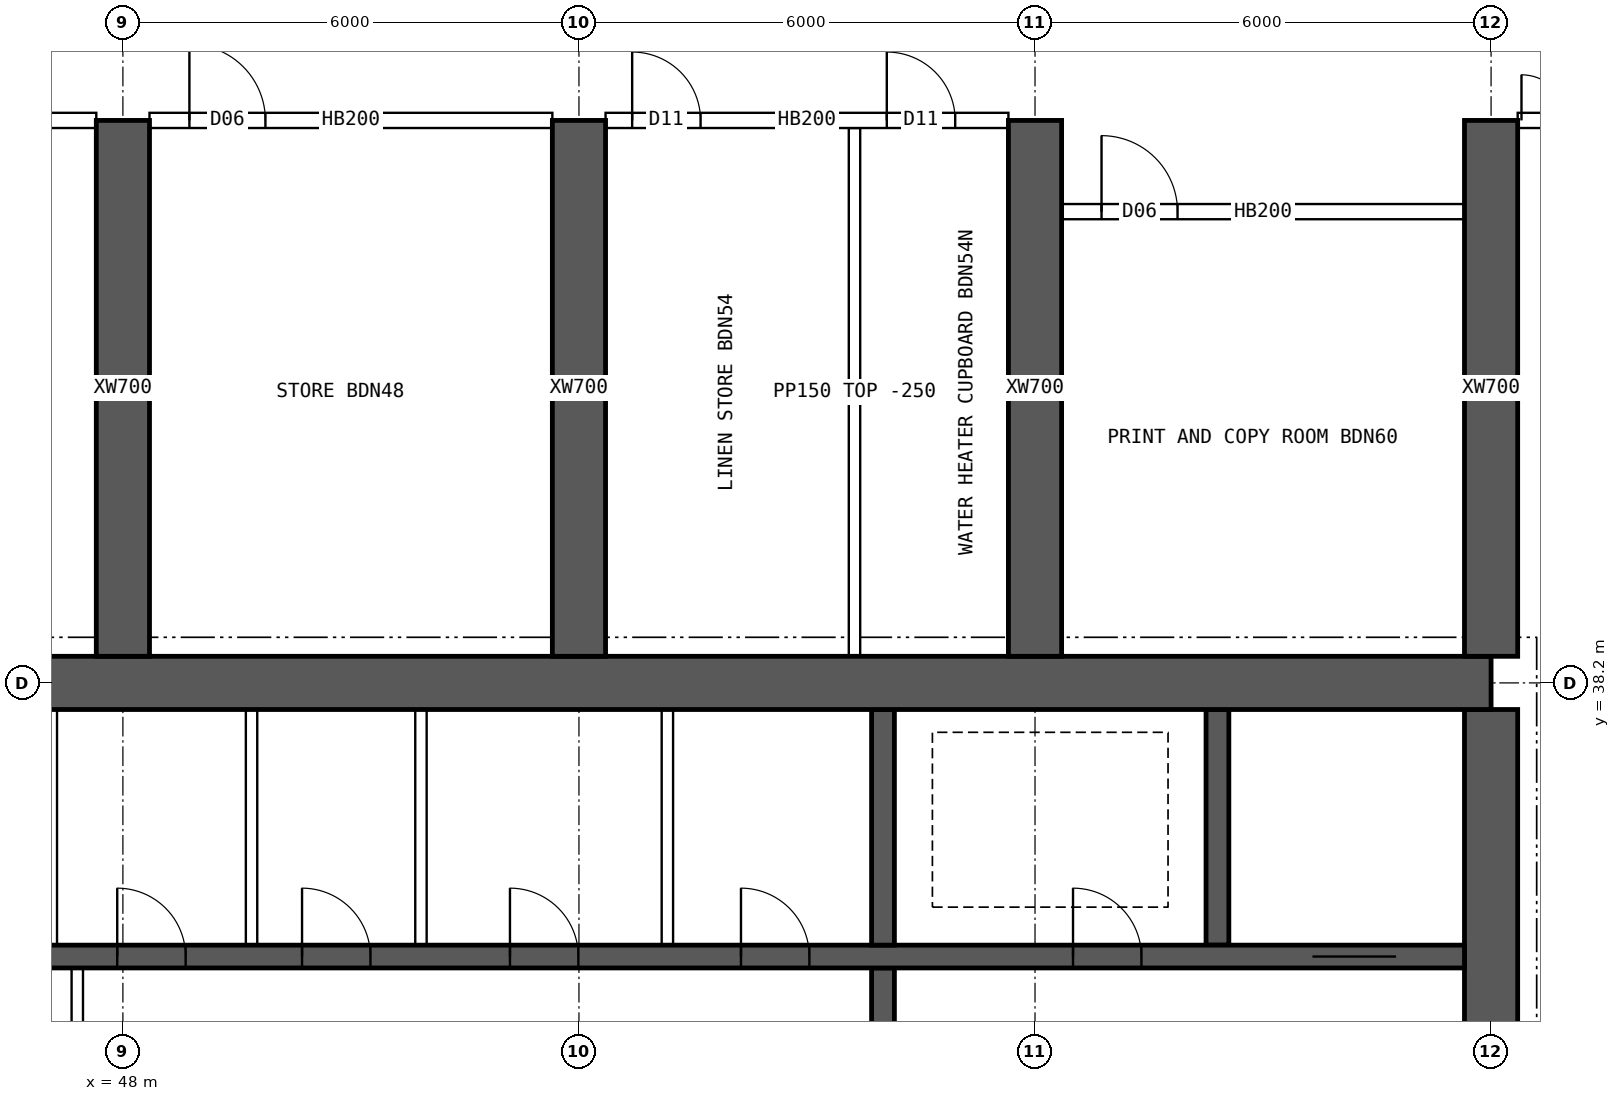
"""IFC4 building model, lengths in metres.
Left out: names, types, materials, properties, quantities, classifications, styles, units other than length and angle.
Written with IfcOpenShell. Run it as: python <this file> out.ifc"""

import sys

from ifc_helpers import new_model, si_unit, direction, frame, frame_2d, origin, place, context, subcontext, project, spatial, rectangle, extrude, element, fill, save


model = new_model("IFC4")
c1 = context("Model", 3, precision=1e-05, world=origin(), true_north=direction((0.0, 1.0)))
c2 = subcontext(c1, "Body", "Model", "MODEL_VIEW")
j1 = project(units=[si_unit("LENGTHUNIT", "METRE"), si_unit("PLANEANGLEUNIT", "RADIAN")], contexts=[c1])
p1 = place(None, origin())
s1 = spatial("IfcSite", under=j1, at=p1, CompositionType="ELEMENT")
p2 = place(p1, origin())
s2 = spatial("IfcBuilding", under=s1, at=p2, CompositionType="ELEMENT")
p3 = place(p2, frame((0.0, 0.0, 224.05)))
s3 = spatial("IfcBuildingStorey", under=s2, at=p3, CompositionType="ELEMENT", Elevation=224.05)
p4 = place(p3, frame((18.0, 38.2, 0.0), z_axis=(0.0, 0.0, 1.0), x_axis=(1.0, 0.0, 0.0)))
e1 = element("IfcWall", 1, at=p4, inside=s3, PredefinedType="SHEAR", context=c2, shape_type="SweptSolid", body=[
    extrude(rectangle(XDim=48.0, YDim=0.7, at=frame_2d((24.0, 0.0))), origin(), (0.0, 0.0, 1.0), 3.75),
])
p5 = place(p3, frame((66.0, 26.15, 0.0), z_axis=(0.0, 0.0, 1.0), x_axis=(0.0, 1.0, 0.0)))
e2 = element("IfcWall", 2, at=p5, inside=s3, PredefinedType="SHEAR", context=c2, shape_type="SweptSolid", body=[
    extrude(rectangle(XDim=11.7, YDim=0.7, at=frame_2d((5.85, 0.0))), origin(), (0.0, 0.0, 1.0), 3.75),
])
p6 = place(p5, frame((5.15, 0.0, 0.0)))
e3 = element("IfcOpeningElement", 3, at=p6, cuts=e2, PredefinedType="OPENING", context=c2, shape_type="SweptSolid", body=[
    extrude(rectangle(XDim=1.2, YDim=2.1, at=frame_2d((0.6, 1.05))), frame((0.0, 0.36, 0.0), z_axis=(0.0, -1.0, 0.0), x_axis=(1.0, 0.0, 0.0)), (0.0, 0.0, 1.0), 0.72),
])
p7 = place(p3, frame((18.35, 34.6, 0.0), z_axis=(0.0, 0.0, 1.0), x_axis=(1.0, 0.0, 0.0)))
e4 = element("IfcWall", 4, at=p7, inside=s3, PredefinedType="SHEAR", context=c2, shape_type="SweptSolid", body=[
    extrude(rectangle(XDim=47.3, YDim=0.3, at=frame_2d((23.65, 0.0))), origin(), (0.0, 0.0, 1.0), 3.75),
])
p8 = place(p7, frame((0.9, 0.0, 0.0)))
e5 = element("IfcOpeningElement", 5, at=p8, cuts=e4, PredefinedType="OPENING", context=c2, shape_type="SweptSolid", body=[
    extrude(rectangle(XDim=1.1, YDim=2.1, at=frame_2d((0.55, 1.05))), frame((0.0, 0.16, 0.0), z_axis=(0.0, -1.0, 0.0), x_axis=(1.0, 0.0, 0.0)), (0.0, 0.0, 1.0), 0.32),
])
p9 = place(p7, frame((45.3, 0.0, 0.0)))
e6 = element("IfcOpeningElement", 6, at=p9, cuts=e4, PredefinedType="OPENING", context=c2, shape_type="SweptSolid", body=[
    extrude(rectangle(XDim=1.1, YDim=2.1, at=frame_2d((0.55, 1.05))), frame((0.0, 0.16, 0.0), z_axis=(0.0, -1.0, 0.0), x_axis=(1.0, 0.0, 0.0)), (0.0, 0.0, 1.0), 0.32),
])
p10 = place(p7, frame((4.25, 0.0, 0.0)))
e7 = element("IfcOpeningElement", 7, at=p10, cuts=e4, PredefinedType="OPENING", context=c2, shape_type="SweptSolid", body=[
    extrude(rectangle(XDim=0.9, YDim=2.1, at=frame_2d((0.45, 1.05))), frame((0.0, 0.16, 0.0), z_axis=(0.0, -1.0, 0.0), x_axis=(1.0, 0.0, 0.0)), (0.0, 0.0, 1.0), 0.32),
])
p11 = place(p7, frame((42.15, 0.0, 0.0)))
e8 = element("IfcOpeningElement", 8, at=p11, cuts=e4, PredefinedType="OPENING", context=c2, shape_type="SweptSolid", body=[
    extrude(rectangle(XDim=0.9, YDim=2.1, at=frame_2d((0.45, 1.05))), frame((0.0, 0.16, 0.0), z_axis=(0.0, -1.0, 0.0), x_axis=(1.0, 0.0, 0.0)), (0.0, 0.0, 1.0), 0.32),
])
p12 = place(p7, frame((9.025, 0.0, 0.0)))
e9 = element("IfcOpeningElement", 9, at=p12, cuts=e4, PredefinedType="OPENING", context=c2, shape_type="SweptSolid", body=[
    extrude(rectangle(XDim=0.9, YDim=2.1, at=frame_2d((0.45, 1.05))), frame((0.0, 0.16, 0.0), z_axis=(0.0, -1.0, 0.0), x_axis=(1.0, 0.0, 0.0)), (0.0, 0.0, 1.0), 0.32),
])
p13 = place(p7, frame((12.999, 0.0, 0.0)))
e10 = element("IfcOpeningElement", 10, at=p13, cuts=e4, PredefinedType="OPENING", context=c2, shape_type="SweptSolid", body=[
    extrude(rectangle(XDim=0.9, YDim=2.1, at=frame_2d((0.45, 1.05))), frame((0.0, 0.16, 0.0), z_axis=(0.0, -1.0, 0.0), x_axis=(1.0, 0.0, 0.0)), (0.0, 0.0, 1.0), 0.32),
])
p14 = place(p7, frame((16.646, 0.0, 0.0)))
e11 = element("IfcOpeningElement", 11, at=p14, cuts=e4, PredefinedType="OPENING", context=c2, shape_type="SweptSolid", body=[
    extrude(rectangle(XDim=0.9, YDim=2.1, at=frame_2d((0.45, 1.05))), frame((0.0, 0.16, 0.0), z_axis=(0.0, -1.0, 0.0), x_axis=(1.0, 0.0, 0.0)), (0.0, 0.0, 1.0), 0.32),
])
p15 = place(p7, frame((20.405, 0.0, 0.0)))
e12 = element("IfcOpeningElement", 12, at=p15, cuts=e4, PredefinedType="OPENING", context=c2, shape_type="SweptSolid", body=[
    extrude(rectangle(XDim=0.9, YDim=2.1, at=frame_2d((0.45, 1.05))), frame((0.0, 0.16, 0.0), z_axis=(0.0, -1.0, 0.0), x_axis=(1.0, 0.0, 0.0)), (0.0, 0.0, 1.0), 0.32),
])
p16 = place(p7, frame((24.811, 0.0, 0.0)))
e13 = element("IfcOpeningElement", 13, at=p16, cuts=e4, PredefinedType="OPENING", context=c2, shape_type="SweptSolid", body=[
    extrude(rectangle(XDim=0.9, YDim=2.1, at=frame_2d((0.45, 1.05))), frame((0.0, 0.16, 0.0), z_axis=(0.0, -1.0, 0.0), x_axis=(1.0, 0.0, 0.0)), (0.0, 0.0, 1.0), 0.32),
])
p17 = place(p7, frame((27.608, 0.0, 0.0)))
e14 = element("IfcOpeningElement", 14, at=p17, cuts=e4, PredefinedType="OPENING", context=c2, shape_type="SweptSolid", body=[
    extrude(rectangle(XDim=0.9, YDim=2.1, at=frame_2d((0.45, 1.05))), frame((0.0, 0.16, 0.0), z_axis=(0.0, -1.0, 0.0), x_axis=(1.0, 0.0, 0.0)), (0.0, 0.0, 1.0), 0.32),
])
p18 = place(p7, frame((29.575, 0.0, 0.0)))
e15 = element("IfcOpeningElement", 15, at=p18, cuts=e4, PredefinedType="OPENING", context=c2, shape_type="SweptSolid", body=[
    extrude(rectangle(XDim=0.9, YDim=2.1, at=frame_2d((0.45, 1.05))), frame((0.0, 0.16, 0.0), z_axis=(0.0, -1.0, 0.0), x_axis=(1.0, 0.0, 0.0)), (0.0, 0.0, 1.0), 0.32),
])
p19 = place(p7, frame((32.007, 0.0, 0.0)))
e16 = element("IfcOpeningElement", 16, at=p19, cuts=e4, PredefinedType="OPENING", context=c2, shape_type="SweptSolid", body=[
    extrude(rectangle(XDim=0.9, YDim=2.1, at=frame_2d((0.45, 1.05))), frame((0.0, 0.16, 0.0), z_axis=(0.0, -1.0, 0.0), x_axis=(1.0, 0.0, 0.0)), (0.0, 0.0, 1.0), 0.32),
])
p20 = place(p7, frame((34.742, 0.0, 0.0)))
e17 = element("IfcOpeningElement", 17, at=p20, cuts=e4, PredefinedType="OPENING", context=c2, shape_type="SweptSolid", body=[
    extrude(rectangle(XDim=0.9, YDim=2.1, at=frame_2d((0.45, 1.05))), frame((0.0, 0.16, 0.0), z_axis=(0.0, -1.0, 0.0), x_axis=(1.0, 0.0, 0.0)), (0.0, 0.0, 1.0), 0.32),
])
p21 = place(p7, frame((37.781, 0.0, 0.0)))
e18 = element("IfcOpeningElement", 18, at=p21, cuts=e4, PredefinedType="OPENING", context=c2, shape_type="SweptSolid", body=[
    extrude(rectangle(XDim=0.9, YDim=2.1, at=frame_2d((0.45, 1.05))), frame((0.0, 0.16, 0.0), z_axis=(0.0, -1.0, 0.0), x_axis=(1.0, 0.0, 0.0)), (0.0, 0.0, 1.0), 0.32),
])
p22 = place(p3, frame((58.0, 30.55, 0.0), z_axis=(0.0, 0.0, 1.0), x_axis=(0.0, 1.0, 0.0)))
e19 = element("IfcWall", 19, at=p22, inside=s3, PredefinedType="SHEAR", context=c2, shape_type="SweptSolid", body=[
    extrude(rectangle(XDim=3.9, YDim=0.3, at=frame_2d((1.95, 0.0))), origin(), (0.0, 0.0, 1.0), 3.75),
])
p23 = place(p22, frame((1.4, 0.0, 0.0)))
e20 = element("IfcOpeningElement", 20, at=p23, cuts=e19, PredefinedType="OPENING", context=c2, shape_type="SweptSolid", body=[
    extrude(rectangle(XDim=1.2, YDim=2.1, at=frame_2d((0.6, 1.05))), frame((0.0, 0.16, 0.0), z_axis=(0.0, -1.0, 0.0), x_axis=(1.0, 0.0, 0.0)), (0.0, 0.0, 1.0), 0.32),
])
for number, where, z_axis, x_axis in (
    (21, (62.4, 34.75, 0.0), (0.0, 0.0, 1.0), (0.0, 1.0, 0.0)),
    (22, (58.0, 34.75, 0.0), (0.0, 0.0, 1.0), (0.0, 1.0, 0.0)),
):
    element("IfcWall", number, at=place(p3, frame(where, z_axis=z_axis, x_axis=x_axis)), inside=s3, PredefinedType="SHEAR", context=c2, shape_type="SweptSolid", body=[
        extrude(rectangle(XDim=3.1, YDim=0.3, at=frame_2d((1.55, 0.0))), origin(), (0.0, 0.0, 1.0), 3.75),
    ])
for number, where, z_axis, x_axis in (
    (23, (48.0, 38.55, 0.0), (0.0, 0.0, 1.0), (0.0, 1.0, 0.0)),
    (24, (54.0, 38.55, 0.0), (0.0, 0.0, 1.0), (0.0, 1.0, 0.0)),
    (25, (60.0, 38.55, 0.0), (0.0, 0.0, 1.0), (0.0, 1.0, 0.0)),
    (26, (66.0, 38.55, 0.0), (0.0, 0.0, 1.0), (0.0, 1.0, 0.0)),
):
    element("IfcWall", number, at=place(p3, frame(where, z_axis=z_axis, x_axis=x_axis)), inside=s3, PredefinedType="SHEAR", context=c2, shape_type="SweptSolid", body=[
        extrude(rectangle(XDim=7.05, YDim=0.7, at=frame_2d((3.525, 0.0))), origin(), (0.0, 0.0, 1.0), 3.75),
    ])
p24 = place(p3, frame((47.4, 30.55, 0.0), z_axis=(0.0, 0.0, 1.0), x_axis=(0.0, 1.0, 0.0)))
e27 = element("IfcWall", 27, at=p24, inside=s3, PredefinedType="SOLIDWALL", context=c2, shape_type="SweptSolid", body=[
    extrude(rectangle(XDim=3.9, YDim=0.15, at=frame_2d((1.95, 0.0))), origin(), (0.0, 0.0, 1.0), 3.5),
])
p25 = place(p24, frame((1.15, 0.0, 0.0)))
e28 = element("IfcOpeningElement", 28, at=p25, cuts=e27, PredefinedType="OPENING", context=c2, shape_type="SweptSolid", body=[
    extrude(rectangle(XDim=1.6, YDim=2.1, at=frame_2d((0.8, 1.05))), frame((0.0, 0.085, 0.0), z_axis=(0.0, -1.0, 0.0), x_axis=(1.0, 0.0, 0.0)), (0.0, 0.0, 1.0), 0.17),
])
for number, where, z_axis, x_axis in (
    (29, (47.058, 34.75, 0.0), (0.0, 0.0, 1.0), (0.0, 1.0, 0.0)),
    (30, (49.692, 34.75, 0.0), (0.0, 0.0, 1.0), (0.0, 1.0, 0.0)),
    (31, (51.921, 34.75, 0.0), (0.0, 0.0, 1.0), (0.0, 1.0, 0.0)),
    (32, (55.163, 34.75, 0.0), (0.0, 0.0, 1.0), (0.0, 1.0, 0.0)),
):
    element("IfcWall", number, at=place(p3, frame(where, z_axis=z_axis, x_axis=x_axis)), inside=s3, PredefinedType="SOLIDWALL", context=c2, shape_type="SweptSolid", body=[
        extrude(rectangle(XDim=3.1, YDim=0.15, at=frame_2d((1.55, 0.0))), origin(), (0.0, 0.0, 1.0), 3.5),
    ])
p26 = place(p3, frame((42.35, 45.6, 0.0), z_axis=(0.0, 0.0, 1.0), x_axis=(1.0, 0.0, 0.0)))
e33 = element("IfcWall", 33, at=p26, inside=s3, PredefinedType="SOLIDWALL", context=c2, shape_type="SweptSolid", body=[
    extrude(rectangle(XDim=5.3, YDim=0.2, at=frame_2d((2.65, 0.0))), origin(), (0.0, 0.0, 1.0), 3.5),
])
p27 = place(p26, frame((0.35, 0.0, 0.0)))
e34 = element("IfcOpeningElement", 34, at=p27, cuts=e33, PredefinedType="OPENING", context=c2, shape_type="SweptSolid", body=[
    extrude(rectangle(XDim=0.9, YDim=2.1, at=frame_2d((0.45, 1.05))), frame((0.0, 0.11, 0.0), z_axis=(0.0, -1.0, 0.0), x_axis=(1.0, 0.0, 0.0)), (0.0, 0.0, 1.0), 0.22),
])
p28 = place(p26, frame((2.735, 0.0, 0.0)))
e35 = element("IfcOpeningElement", 35, at=p28, cuts=e33, PredefinedType="OPENING", context=c2, shape_type="SweptSolid", body=[
    extrude(rectangle(XDim=0.9, YDim=2.1, at=frame_2d((0.45, 1.05))), frame((0.0, 0.11, 0.0), z_axis=(0.0, -1.0, 0.0), x_axis=(1.0, 0.0, 0.0)), (0.0, 0.0, 1.0), 0.22),
])
p29 = place(p3, frame((48.35, 45.6, 0.0), z_axis=(0.0, 0.0, 1.0), x_axis=(1.0, 0.0, 0.0)))
e36 = element("IfcWall", 36, at=p29, inside=s3, PredefinedType="SOLIDWALL", context=c2, shape_type="SweptSolid", body=[
    extrude(rectangle(XDim=5.3, YDim=0.2, at=frame_2d((2.65, 0.0))), origin(), (0.0, 0.0, 1.0), 3.5),
])
p30 = place(p29, frame((0.525, 0.0, 0.0)))
e37 = element("IfcOpeningElement", 37, at=p30, cuts=e36, PredefinedType="OPENING", context=c2, shape_type="SweptSolid", body=[
    extrude(rectangle(XDim=1.0, YDim=2.1, at=frame_2d((0.5, 1.05))), frame((0.0, 0.11, 0.0), z_axis=(0.0, -1.0, 0.0), x_axis=(1.0, 0.0, 0.0)), (0.0, 0.0, 1.0), 0.22),
])
p31 = place(p3, frame((54.35, 45.6, 0.0), z_axis=(0.0, 0.0, 1.0), x_axis=(1.0, 0.0, 0.0)))
e38 = element("IfcWall", 38, at=p31, inside=s3, PredefinedType="SOLIDWALL", context=c2, shape_type="SweptSolid", body=[
    extrude(rectangle(XDim=5.3, YDim=0.2, at=frame_2d((2.65, 0.0))), origin(), (0.0, 0.0, 1.0), 3.5),
])
p32 = place(p31, frame((0.35, 0.0, 0.0)))
e39 = element("IfcOpeningElement", 39, at=p32, cuts=e38, PredefinedType="OPENING", context=c2, shape_type="SweptSolid", body=[
    extrude(rectangle(XDim=0.9, YDim=2.1, at=frame_2d((0.45, 1.05))), frame((0.0, 0.11, 0.0), z_axis=(0.0, -1.0, 0.0), x_axis=(1.0, 0.0, 0.0)), (0.0, 0.0, 1.0), 0.22),
])
p33 = place(p31, frame((3.7, 0.0, 0.0)))
e40 = element("IfcOpeningElement", 40, at=p33, cuts=e38, PredefinedType="OPENING", context=c2, shape_type="SweptSolid", body=[
    extrude(rectangle(XDim=0.9, YDim=2.1, at=frame_2d((0.45, 1.05))), frame((0.0, 0.11, 0.0), z_axis=(0.0, -1.0, 0.0), x_axis=(1.0, 0.0, 0.0)), (0.0, 0.0, 1.0), 0.22),
])
p34 = place(p3, frame((66.35, 45.6, 0.0), z_axis=(0.0, 0.0, 1.0), x_axis=(1.0, 0.0, 0.0)))
e41 = element("IfcWall", 41, at=p34, inside=s3, PredefinedType="SOLIDWALL", context=c2, shape_type="SweptSolid", body=[
    extrude(rectangle(XDim=2.05, YDim=0.2, at=frame_2d((1.025, 0.0))), origin(), (0.0, 0.0, 1.0), 3.5),
])
p35 = place(p34, frame((0.05, 0.0, 0.0)))
e42 = element("IfcOpeningElement", 42, at=p35, cuts=e41, PredefinedType="OPENING", context=c2, shape_type="SweptSolid", body=[
    extrude(rectangle(XDim=1.2, YDim=2.1, at=frame_2d((0.6, 1.05))), frame((0.0, 0.11, 0.0), z_axis=(0.0, -1.0, 0.0), x_axis=(1.0, 0.0, 0.0)), (0.0, 0.0, 1.0), 0.22),
])
p36 = place(p3, frame((57.625, 38.55, 0.0), z_axis=(0.0, 0.0, 1.0), x_axis=(0.0, 1.0, 0.0)))
e43 = element("IfcWall", 43, at=p36, inside=s3, PredefinedType="PARTITIONING", context=c2, shape_type="SweptSolid", body=[
    extrude(rectangle(XDim=6.95, YDim=0.15, at=frame_2d((3.475, 0.0))), origin(), (0.0, 0.0, 1.0), 3.5),
])
p37 = place(p3, frame((60.35, 44.4, 0.0), z_axis=(0.0, 0.0, 1.0), x_axis=(1.0, 0.0, 0.0)))
e44 = element("IfcWall", 44, at=p37, inside=s3, PredefinedType="SOLIDWALL", context=c2, shape_type="SweptSolid", body=[
    extrude(rectangle(XDim=5.3, YDim=0.2, at=frame_2d((2.65, 0.0))), origin(), (0.0, 0.0, 1.0), 3.5),
])
p38 = place(p37, frame((0.525, 0.0, 0.0)))
e45 = element("IfcOpeningElement", 45, at=p38, cuts=e44, PredefinedType="OPENING", context=c2, shape_type="SweptSolid", body=[
    extrude(rectangle(XDim=1.0, YDim=2.1, at=frame_2d((0.5, 1.05))), frame((0.0, 0.11, 0.0), z_axis=(0.0, -1.0, 0.0), x_axis=(1.0, 0.0, 0.0)), (0.0, 0.0, 1.0), 0.22),
])
p39 = place(p9, origin())
e46 = element("IfcDoor", 46, at=p39, inside=s3, OperationType="DOUBLE_DOOR_SLIDING", PredefinedType="DOOR", context=c2, shape_type="SweptSolid", body=[
    extrude(rectangle(XDim=1.1, YDim=2.1, at=frame_2d((0.55, 1.05))), frame((0.0, 0.025, 0.0), z_axis=(0.0, -1.0, 0.0), x_axis=(1.0, 0.0, 0.0)), (0.0, 0.0, 1.0), 0.05),
])
fill(e6, e46)
p40 = place(p11, origin())
e47 = element("IfcDoor", 47, at=p40, inside=s3, OperationType="SINGLE_SWING_LEFT", PredefinedType="DOOR", context=c2, shape_type="SweptSolid", body=[
    extrude(rectangle(XDim=0.9, YDim=2.1, at=frame_2d((0.45, 1.05))), frame((0.0, 0.025, 0.0), z_axis=(0.0, -1.0, 0.0), x_axis=(1.0, 0.0, 0.0)), (0.0, 0.0, 1.0), 0.05),
])
fill(e8, e47)
p41 = place(p18, origin())
e48 = element("IfcDoor", 48, at=p41, inside=s3, OperationType="SINGLE_SWING_LEFT", PredefinedType="DOOR", context=c2, shape_type="SweptSolid", body=[
    extrude(rectangle(XDim=0.9, YDim=2.1, at=frame_2d((0.45, 1.05))), frame((0.0, 0.025, 0.0), z_axis=(0.0, -1.0, 0.0), x_axis=(1.0, 0.0, 0.0)), (0.0, 0.0, 1.0), 0.05),
])
fill(e15, e48)
p42 = place(p19, origin())
e49 = element("IfcDoor", 49, at=p42, inside=s3, OperationType="SINGLE_SWING_LEFT", PredefinedType="DOOR", context=c2, shape_type="SweptSolid", body=[
    extrude(rectangle(XDim=0.9, YDim=2.1, at=frame_2d((0.45, 1.05))), frame((0.0, 0.025, 0.0), z_axis=(0.0, -1.0, 0.0), x_axis=(1.0, 0.0, 0.0)), (0.0, 0.0, 1.0), 0.05),
])
fill(e16, e49)
p43 = place(p20, origin())
e50 = element("IfcDoor", 50, at=p43, inside=s3, OperationType="SINGLE_SWING_LEFT", PredefinedType="DOOR", context=c2, shape_type="SweptSolid", body=[
    extrude(rectangle(XDim=0.9, YDim=2.1, at=frame_2d((0.45, 1.05))), frame((0.0, 0.025, 0.0), z_axis=(0.0, -1.0, 0.0), x_axis=(1.0, 0.0, 0.0)), (0.0, 0.0, 1.0), 0.05),
])
fill(e17, e50)
p44 = place(p21, origin())
e51 = element("IfcDoor", 51, at=p44, inside=s3, OperationType="SINGLE_SWING_LEFT", PredefinedType="DOOR", context=c2, shape_type="SweptSolid", body=[
    extrude(rectangle(XDim=0.9, YDim=2.1, at=frame_2d((0.45, 1.05))), frame((0.0, 0.025, 0.0), z_axis=(0.0, -1.0, 0.0), x_axis=(1.0, 0.0, 0.0)), (0.0, 0.0, 1.0), 0.05),
])
fill(e18, e51)
p45 = place(p35, origin())
e52 = element("IfcDoor", 52, at=p45, inside=s3, OperationType="DOUBLE_DOOR_SINGLE_SWING", PredefinedType="DOOR", context=c2, shape_type="SweptSolid", body=[
    extrude(rectangle(XDim=1.2, YDim=2.1, at=frame_2d((0.6, 1.05))), frame((0.0, 0.025, 0.0), z_axis=(0.0, -1.0, 0.0), x_axis=(1.0, 0.0, 0.0)), (0.0, 0.0, 1.0), 0.05),
])
fill(e42, e52)
p46 = place(p30, origin())
e53 = element("IfcDoor", 53, at=p46, inside=s3, OperationType="SINGLE_SWING_LEFT", PredefinedType="DOOR", context=c2, shape_type="SweptSolid", body=[
    extrude(rectangle(XDim=1.0, YDim=2.1, at=frame_2d((0.5, 1.05))), frame((0.0, 0.025, 0.0), z_axis=(0.0, -1.0, 0.0), x_axis=(1.0, 0.0, 0.0)), (0.0, 0.0, 1.0), 0.05),
])
fill(e37, e53)
p47 = place(p32, origin())
e54 = element("IfcDoor", 54, at=p47, inside=s3, OperationType="SINGLE_SWING_LEFT", PredefinedType="DOOR", context=c2, shape_type="SweptSolid", body=[
    extrude(rectangle(XDim=0.9, YDim=2.1, at=frame_2d((0.45, 1.05))), frame((0.0, 0.025, 0.0), z_axis=(0.0, -1.0, 0.0), x_axis=(1.0, 0.0, 0.0)), (0.0, 0.0, 1.0), 0.05),
])
fill(e39, e54)
p48 = place(p33, origin())
e55 = element("IfcDoor", 55, at=p48, inside=s3, OperationType="SINGLE_SWING_LEFT", PredefinedType="DOOR", context=c2, shape_type="SweptSolid", body=[
    extrude(rectangle(XDim=0.9, YDim=2.1, at=frame_2d((0.45, 1.05))), frame((0.0, 0.025, 0.0), z_axis=(0.0, -1.0, 0.0), x_axis=(1.0, 0.0, 0.0)), (0.0, 0.0, 1.0), 0.05),
])
fill(e40, e55)
p49 = place(p38, origin())
e56 = element("IfcDoor", 56, at=p49, inside=s3, OperationType="SINGLE_SWING_LEFT", PredefinedType="DOOR", context=c2, shape_type="SweptSolid", body=[
    extrude(rectangle(XDim=1.0, YDim=2.1, at=frame_2d((0.5, 1.05))), frame((0.0, 0.025, 0.0), z_axis=(0.0, -1.0, 0.0), x_axis=(1.0, 0.0, 0.0)), (0.0, 0.0, 1.0), 0.05),
])
fill(e45, e56)
save(model, sys.argv[1])
